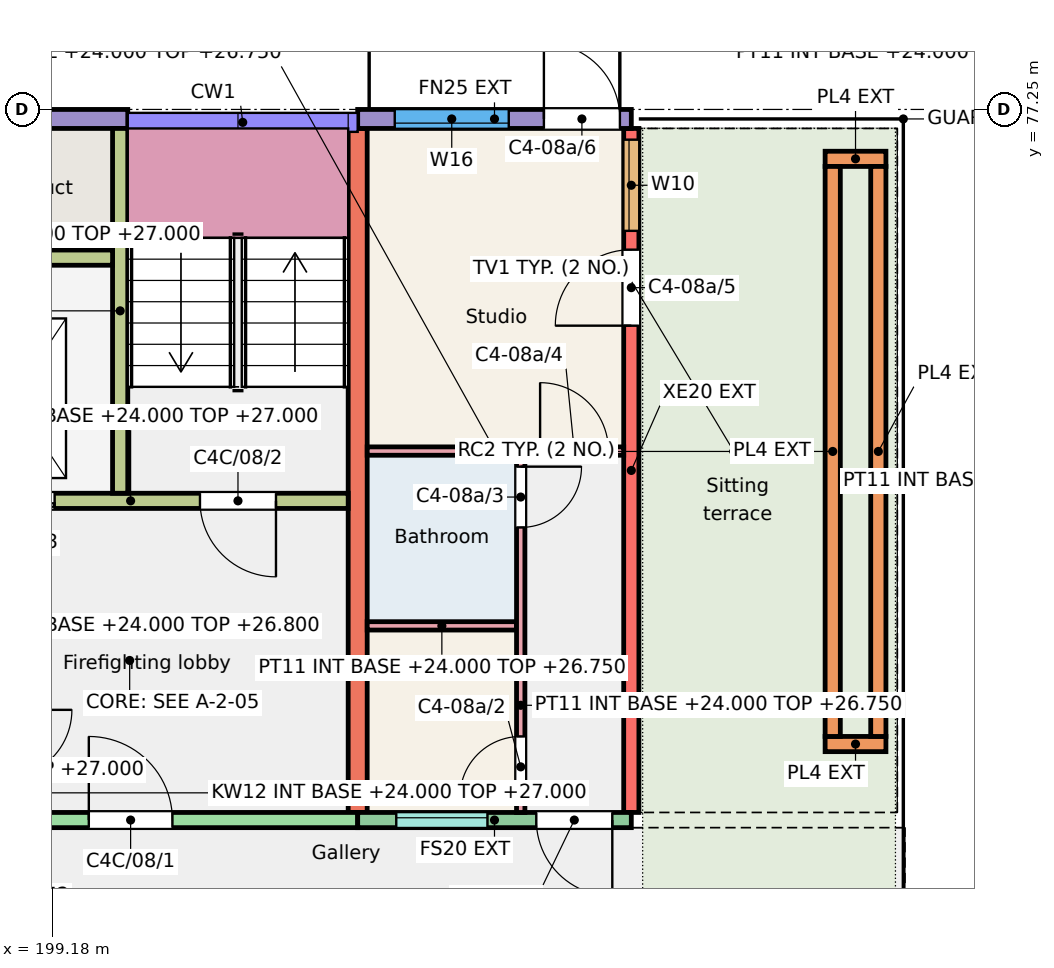
"""IFC4 building model, lengths in metres.
Left out: names, types, materials, properties, quantities, classifications, styles, units other than length and angle.
Written with IfcOpenShell. Run it as: python <this file> out.ifc"""

import sys

from ifc_helpers import new_model, si_unit, direction, frame, frame_2d, origin, place, context, subcontext, project, spatial, rectangle, extrude, element, fill, save


model = new_model("IFC4")
c1 = context("Model", 3, precision=1e-05, world=origin(), true_north=direction((0.0, 1.0)))
c2 = subcontext(c1, "Body", "Model", "MODEL_VIEW")
j1 = project(units=[si_unit("LENGTHUNIT", "METRE"), si_unit("PLANEANGLEUNIT", "RADIAN")], contexts=[c1])
p1 = place(None, origin())
s1 = spatial("IfcSite", under=j1, at=p1, CompositionType="ELEMENT")
p2 = place(p1, origin())
s2 = spatial("IfcBuilding", under=s1, at=p2, CompositionType="ELEMENT")
p3 = place(p2, frame((0.0, 0.0, 24.0)))
s3 = spatial("IfcBuildingStorey", under=s2, at=p3, CompositionType="ELEMENT", Elevation=24.0)
p4 = place(p3, frame((203.2, 68.0, 0.0), z_axis=(0.0, 0.0, 1.0), x_axis=(0.0, 1.0, 0.0)))
e1 = element("IfcWall", 1, at=p4, inside=s3, PredefinedType="SHEAR", context=c2, shape_type="SweptSolid", body=[
    extrude(rectangle(XDim=9.0, YDim=0.25, at=frame_2d((4.5, 0.0))), origin(), (0.0, 0.0, 1.0), 3.0),
])
p5 = place(p3, frame((206.8, 68.0, 0.0), z_axis=(0.0, 0.0, 1.0), x_axis=(0.0, 1.0, 0.0)))
e2 = element("IfcWall", 2, at=p5, inside=s3, PredefinedType="SHEAR", context=c2, shape_type="SweptSolid", body=[
    extrude(rectangle(XDim=9.0, YDim=0.2, at=frame_2d((4.5, 0.0))), origin(), (0.0, 0.0, 1.0), 3.0),
])
p6 = place(p5, frame((7.653, 0.0, 0.9)))
e3 = element("IfcOpeningElement", 3, at=p6, cuts=e2, PredefinedType="OPENING", context=c2, shape_type="SweptSolid", body=[
    extrude(rectangle(XDim=1.2, YDim=1.5, at=frame_2d((0.6, 0.75))), frame((0.0, 0.11, 0.0), z_axis=(0.0, -1.0, 0.0), x_axis=(1.0, 0.0, 0.0)), (0.0, 0.0, 1.0), 0.22),
])
p7 = place(p5, frame((6.405, 0.0, 0.0)))
e4 = element("IfcOpeningElement", 4, at=p7, cuts=e2, PredefinedType="OPENING", context=c2, shape_type="SweptSolid", body=[
    extrude(rectangle(XDim=1.0, YDim=2.1, at=frame_2d((0.5, 1.05))), frame((0.0, 0.11, 0.0), z_axis=(0.0, -1.0, 0.0), x_axis=(1.0, 0.0, 0.0)), (0.0, 0.0, 1.0), 0.22),
])
p8 = place(p3, frame((197.2, 77.125, 0.0), z_axis=(0.0, 0.0, 1.0), x_axis=(1.0, 0.0, 0.0)))
e5 = element("IfcWall", 5, at=p8, inside=s3, PredefinedType="SOLIDWALL", context=c2, shape_type="SweptSolid", body=[
    extrude(rectangle(XDim=2.975, YDim=0.25, at=frame_2d((1.488, 0.0))), origin(), (0.0, 0.0, 1.0), 3.0),
])
p9 = place(p3, frame((197.35, 67.9, 0.0), z_axis=(0.0, 0.0, 1.0), x_axis=(1.0, 0.0, 0.0)))
e6 = element("IfcWall", 6, at=p9, inside=s3, PredefinedType="SHEAR", context=c2, shape_type="SweptSolid", body=[
    extrude(rectangle(XDim=5.85, YDim=0.2, at=frame_2d((2.925, 0.0))), origin(), (0.0, 0.0, 1.0), 3.0),
])
p10 = place(p9, frame((2.312, 0.0, 0.0)))
e7 = element("IfcOpeningElement", 7, at=p10, cuts=e6, PredefinedType="OPENING", context=c2, shape_type="SweptSolid", body=[
    extrude(rectangle(XDim=1.1, YDim=2.1, at=frame_2d((0.55, 1.05))), frame((0.0, 0.11, 0.0), z_axis=(0.0, -1.0, 0.0), x_axis=(1.0, 0.0, 0.0)), (0.0, 0.0, 1.0), 0.22),
])
p11 = place(p3, frame((197.35, 72.1, 0.0), z_axis=(0.0, 0.0, 1.0), x_axis=(1.0, 0.0, 0.0)))
e8 = element("IfcWall", 8, at=p11, inside=s3, PredefinedType="SHEAR", context=c2, shape_type="SweptSolid", body=[
    extrude(rectangle(XDim=5.725, YDim=0.2, at=frame_2d((2.862, 0.0))), origin(), (0.0, 0.0, 1.0), 3.0),
])
p12 = place(p11, frame((3.775, 0.0, 0.0)))
e9 = element("IfcOpeningElement", 9, at=p12, cuts=e8, PredefinedType="OPENING", context=c2, shape_type="SweptSolid", body=[
    extrude(rectangle(XDim=1.0, YDim=2.1, at=frame_2d((0.5, 1.05))), frame((0.0, 0.11, 0.0), z_axis=(0.0, -1.0, 0.0), x_axis=(1.0, 0.0, 0.0)), (0.0, 0.0, 1.0), 0.22),
])
p13 = place(p11, frame((0.762, 0.0, 0.0)))
e10 = element("IfcOpeningElement", 10, at=p13, cuts=e8, PredefinedType="OPENING", context=c2, shape_type="SweptSolid", body=[
    extrude(rectangle(XDim=1.1, YDim=2.1, at=frame_2d((0.55, 1.05))), frame((0.0, 0.11, 0.0), z_axis=(0.0, -1.0, 0.0), x_axis=(1.0, 0.0, 0.0)), (0.0, 0.0, 1.0), 0.22),
])
p14 = place(p3, frame((200.075, 72.2, 0.0), z_axis=(0.0, 0.0, 1.0), x_axis=(0.0, 1.0, 0.0)))
e11 = element("IfcWall", 11, at=p14, inside=s3, PredefinedType="SHEAR", context=c2, shape_type="SweptSolid", body=[
    extrude(rectangle(XDim=4.8, YDim=0.2, at=frame_2d((2.4, 0.0))), origin(), (0.0, 0.0, 1.0), 3.0),
])
p15 = place(p3, frame((197.35, 75.3, 0.0), z_axis=(0.0, 0.0, 1.0), x_axis=(1.0, 0.0, 0.0)))
e12 = element("IfcWall", 12, at=p15, inside=s3, PredefinedType="SHEAR", context=c2, shape_type="SweptSolid", body=[
    extrude(rectangle(XDim=2.625, YDim=0.2, at=frame_2d((1.312, 0.0))), origin(), (0.0, 0.0, 1.0), 3.0),
])
p16 = place(p3, frame((203.2, 77.125, 0.0), z_axis=(0.0, 0.0, 1.0), x_axis=(1.0, 0.0, 0.0)))
e13 = element("IfcWall", 13, at=p16, inside=s3, PredefinedType="SOLIDWALL", context=c2, shape_type="SweptSolid", body=[
    extrude(rectangle(XDim=3.6, YDim=0.25, at=frame_2d((1.8, 0.0))), origin(), (0.0, 0.0, 1.0), 3.0),
])
p17 = place(p16, frame((0.488, 0.0, 0.9)))
e14 = element("IfcOpeningElement", 14, at=p17, cuts=e13, PredefinedType="OPENING", context=c2, shape_type="SweptSolid", body=[
    extrude(rectangle(XDim=1.5, YDim=1.5, at=frame_2d((0.75, 0.75))), frame((0.0, 0.135, 0.0), z_axis=(0.0, -1.0, 0.0), x_axis=(1.0, 0.0, 0.0)), (0.0, 0.0, 1.0), 0.27),
])
p18 = place(p16, frame((2.45, 0.0, 0.0)))
e15 = element("IfcOpeningElement", 15, at=p18, cuts=e13, PredefinedType="OPENING", context=c2, shape_type="SweptSolid", body=[
    extrude(rectangle(XDim=1.0, YDim=2.1, at=frame_2d((0.5, 1.05))), frame((0.0, 0.135, 0.0), z_axis=(0.0, -1.0, 0.0), x_axis=(1.0, 0.0, 0.0)), (0.0, 0.0, 1.0), 0.27),
])
p19 = place(p3, frame((203.2, 67.9, 0.0), z_axis=(0.0, 0.0, 1.0), x_axis=(1.0, 0.0, 0.0)))
e16 = element("IfcWall", 16, at=p19, inside=s3, PredefinedType="SOLIDWALL", context=c2, shape_type="SweptSolid", body=[
    extrude(rectangle(XDim=3.6, YDim=0.2, at=frame_2d((1.8, 0.0))), origin(), (0.0, 0.0, 1.0), 3.0),
])
p20 = place(p19, frame((0.508, 0.0, 1.1)))
e17 = element("IfcOpeningElement", 17, at=p20, cuts=e16, PredefinedType="OPENING", context=c2, shape_type="SweptSolid", body=[
    extrude(rectangle(XDim=1.2, YDim=1.3, at=frame_2d((0.6, 0.65))), frame((0.0, 0.11, 0.0), z_axis=(0.0, -1.0, 0.0), x_axis=(1.0, 0.0, 0.0)), (0.0, 0.0, 1.0), 0.22),
])
p21 = place(p19, frame((2.35, 0.0, 0.0)))
e18 = element("IfcOpeningElement", 18, at=p21, cuts=e16, PredefinedType="OPENING", context=c2, shape_type="SweptSolid", body=[
    extrude(rectangle(XDim=1.0, YDim=2.1, at=frame_2d((0.5, 1.05))), frame((0.0, 0.11, 0.0), z_axis=(0.0, -1.0, 0.0), x_axis=(1.0, 0.0, 0.0)), (0.0, 0.0, 1.0), 0.22),
])
for number, where, z_axis, x_axis in (
    (19, (209.35, 68.9, 0.01), (0.0, 0.0, 1.0), (1.0, 0.0, 0.0)),
    (20, (209.35, 76.6, 0.01), (0.0, 0.0, 1.0), (1.0, 0.0, 0.0)),
):
    element("IfcWall", number, at=place(p3, frame(where, z_axis=z_axis, x_axis=x_axis)), inside=s3, PredefinedType="SOLIDWALL", context=c2, shape_type="SweptSolid", body=[
        extrude(rectangle(XDim=0.8, YDim=0.2, at=frame_2d((0.4, 0.0))), origin(), (0.0, 0.0, 1.0), 0.45),
    ])
for number, where, z_axis, x_axis in (
    (21, (209.45, 69.0, 0.01), (0.0, 0.0, 1.0), (0.0, 1.0, 0.0)),
    (22, (210.05, 69.0, 0.01), (0.0, 0.0, 1.0), (0.0, 1.0, 0.0)),
):
    element("IfcWall", number, at=place(p3, frame(where, z_axis=z_axis, x_axis=x_axis)), inside=s3, PredefinedType="SOLIDWALL", context=c2, shape_type="SweptSolid", body=[
        extrude(rectangle(XDim=7.5, YDim=0.2, at=frame_2d((3.75, 0.0))), origin(), (0.0, 0.0, 1.0), 0.45),
    ])
p22 = place(p3, frame((203.325, 70.455, 0.0), z_axis=(0.0, 0.0, 1.0), x_axis=(1.0, 0.0, 0.0)))
e23 = element("IfcWall", 23, at=p22, inside=s3, PredefinedType="PARTITIONING", context=c2, shape_type="SweptSolid", body=[
    extrude(rectangle(XDim=1.965, YDim=0.11, at=frame_2d((0.982, 0.0))), origin(), (0.0, 0.0, 1.0), 2.75),
])
p23 = place(p3, frame((205.345, 68.0, 0.0), z_axis=(0.0, 0.0, 1.0), x_axis=(0.0, 1.0, 0.0)))
e24 = element("IfcWall", 24, at=p23, inside=s3, PredefinedType="PARTITIONING", context=c2, shape_type="SweptSolid", body=[
    extrude(rectangle(XDim=4.7, YDim=0.11, at=frame_2d((2.35, 0.0))), origin(), (0.0, 0.0, 1.0), 2.75),
])
p24 = place(p23, frame((0.2, 0.0, 0.0)))
e25 = element("IfcOpeningElement", 25, at=p24, cuts=e24, PredefinedType="OPENING", context=c2, shape_type="SweptSolid", body=[
    extrude(rectangle(XDim=0.8, YDim=2.1, at=frame_2d((0.4, 1.05))), frame((0.0, 0.065, 0.0), z_axis=(0.0, -1.0, 0.0), x_axis=(1.0, 0.0, 0.0)), (0.0, 0.0, 1.0), 0.13),
])
p25 = place(p23, frame((3.75, 0.0, 0.0)))
e26 = element("IfcOpeningElement", 26, at=p25, cuts=e24, PredefinedType="OPENING", context=c2, shape_type="SweptSolid", body=[
    extrude(rectangle(XDim=0.8, YDim=2.1, at=frame_2d((0.4, 1.05))), frame((0.0, 0.065, 0.0), z_axis=(0.0, -1.0, 0.0), x_axis=(1.0, 0.0, 0.0)), (0.0, 0.0, 1.0), 0.13),
])
p26 = place(p3, frame((203.325, 72.755, 0.0), z_axis=(0.0, 0.0, 1.0), x_axis=(1.0, 0.0, 0.0)))
e27 = element("IfcWall", 27, at=p26, inside=s3, PredefinedType="PARTITIONING", context=c2, shape_type="SweptSolid", body=[
    extrude(rectangle(XDim=3.375, YDim=0.11, at=frame_2d((1.688, 0.0))), origin(), (0.0, 0.0, 1.0), 2.75),
])
p27 = place(p26, frame((2.275, 0.0, 0.0)))
e28 = element("IfcOpeningElement", 28, at=p27, cuts=e27, PredefinedType="OPENING", context=c2, shape_type="SweptSolid", body=[
    extrude(rectangle(XDim=0.9, YDim=2.1, at=frame_2d((0.45, 1.05))), frame((0.0, 0.065, 0.0), z_axis=(0.0, -1.0, 0.0), x_axis=(1.0, 0.0, 0.0)), (0.0, 0.0, 1.0), 0.13),
])
p28 = place(p20, origin())
e29 = element("IfcWindow", 29, at=p28, inside=s3, PartitioningType="SINGLE_PANEL", PredefinedType="WINDOW", context=c2, shape_type="SweptSolid", body=[
    extrude(rectangle(XDim=1.2, YDim=1.3, at=frame_2d((0.6, 0.65))), frame((0.0, 0.06, 0.0), z_axis=(0.0, -1.0, 0.0), x_axis=(1.0, 0.0, 0.0)), (0.0, 0.0, 1.0), 0.06),
])
fill(e17, e29)
p29 = place(p17, origin())
e30 = element("IfcWindow", 30, at=p29, inside=s3, PartitioningType="SINGLE_PANEL", PredefinedType="WINDOW", context=c2, shape_type="SweptSolid", body=[
    extrude(rectangle(XDim=1.5, YDim=1.5, at=frame_2d((0.75, 0.75))), frame((0.0, -0.025, 0.0), z_axis=(0.0, -1.0, 0.0), x_axis=(1.0, 0.0, 0.0)), (0.0, 0.0, 1.0), 0.06),
])
fill(e14, e30)
p30 = place(p6, origin())
e31 = element("IfcWindow", 31, at=p30, inside=s3, PartitioningType="SINGLE_PANEL", PredefinedType="WINDOW", context=c2, shape_type="SweptSolid", body=[
    extrude(rectangle(XDim=1.2, YDim=1.5, at=frame_2d((0.6, 0.75))), frame((0.0, 0.06, 0.0), z_axis=(0.0, -1.0, 0.0), x_axis=(1.0, 0.0, 0.0)), (0.0, 0.0, 1.0), 0.06),
])
fill(e3, e31)
p31 = place(p21, origin())
e32 = element("IfcDoor", 32, at=p31, inside=s3, OperationType="SINGLE_SWING_RIGHT", PredefinedType="DOOR", context=c2, shape_type="SweptSolid", body=[
    extrude(rectangle(XDim=1.0, YDim=2.1, at=frame_2d((0.5, 1.05))), frame((0.0, 0.025, 0.0), z_axis=(0.0, -1.0, 0.0), x_axis=(1.0, 0.0, 0.0)), (0.0, 0.0, 1.0), 0.05),
])
fill(e18, e32)
p32 = place(p24, origin())
e33 = element("IfcDoor", 33, at=p32, inside=s3, OperationType="SINGLE_SWING_LEFT", PredefinedType="DOOR", context=c2, shape_type="SweptSolid", body=[
    extrude(rectangle(XDim=0.8, YDim=2.1, at=frame_2d((0.4, 1.05))), frame((0.0, 0.025, 0.0), z_axis=(0.0, -1.0, 0.0), x_axis=(1.0, 0.0, 0.0)), (0.0, 0.0, 1.0), 0.05),
])
fill(e25, e33)
p33 = place(p25, origin())
e34 = element("IfcDoor", 34, at=p33, inside=s3, OperationType="SINGLE_SWING_RIGHT", PredefinedType="DOOR", context=c2, shape_type="SweptSolid", body=[
    extrude(rectangle(XDim=0.8, YDim=2.1, at=frame_2d((0.4, 1.05))), frame((0.0, 0.025, 0.0), z_axis=(0.0, -1.0, 0.0), x_axis=(1.0, 0.0, 0.0)), (0.0, 0.0, 1.0), 0.05),
])
fill(e26, e34)
p34 = place(p27, origin())
e35 = element("IfcDoor", 35, at=p34, inside=s3, OperationType="SINGLE_SWING_LEFT", PredefinedType="DOOR", context=c2, shape_type="SweptSolid", body=[
    extrude(rectangle(XDim=0.9, YDim=2.1, at=frame_2d((0.45, 1.05))), frame((0.0, 0.025, 0.0), z_axis=(0.0, -1.0, 0.0), x_axis=(1.0, 0.0, 0.0)), (0.0, 0.0, 1.0), 0.05),
])
fill(e28, e35)
p35 = place(p7, origin())
e36 = element("IfcDoor", 36, at=p35, inside=s3, OperationType="SINGLE_SWING_LEFT", PredefinedType="DOOR", context=c2, shape_type="SweptSolid", body=[
    extrude(rectangle(XDim=1.0, YDim=2.1, at=frame_2d((0.5, 1.05))), frame((0.0, 0.025, 0.0), z_axis=(0.0, -1.0, 0.0), x_axis=(1.0, 0.0, 0.0)), (0.0, 0.0, 1.0), 0.05),
])
fill(e4, e36)
p36 = place(p18, origin())
e37 = element("IfcDoor", 37, at=p36, inside=s3, OperationType="SINGLE_SWING_LEFT", PredefinedType="DOOR", context=c2, shape_type="SweptSolid", body=[
    extrude(rectangle(XDim=1.0, YDim=2.1, at=frame_2d((0.5, 1.05))), frame((0.0, 0.025, 0.0), z_axis=(0.0, -1.0, 0.0), x_axis=(1.0, 0.0, 0.0)), (0.0, 0.0, 1.0), 0.05),
])
fill(e15, e37)
p37 = place(p10, origin())
e38 = element("IfcDoor", 38, at=p37, inside=s3, OperationType="SINGLE_SWING_LEFT", PredefinedType="DOOR", context=c2, shape_type="SweptSolid", body=[
    extrude(rectangle(XDim=1.1, YDim=2.1, at=frame_2d((0.55, 1.05))), frame((0.0, 0.025, 0.0), z_axis=(0.0, -1.0, 0.0), x_axis=(1.0, 0.0, 0.0)), (0.0, 0.0, 1.0), 0.05),
])
fill(e7, e38)
p38 = place(p12, origin())
e39 = element("IfcDoor", 39, at=p38, inside=s3, OperationType="SINGLE_SWING_RIGHT", PredefinedType="DOOR", context=c2, shape_type="SweptSolid", body=[
    extrude(rectangle(XDim=1.0, YDim=2.1, at=frame_2d((0.5, 1.05))), frame((0.0, 0.025, 0.0), z_axis=(0.0, -1.0, 0.0), x_axis=(1.0, 0.0, 0.0)), (0.0, 0.0, 1.0), 0.05),
])
fill(e9, e39)
p39 = place(p13, origin())
e40 = element("IfcDoor", 40, at=p39, inside=s3, OperationType="DOUBLE_DOOR_SLIDING", PredefinedType="DOOR", context=c2, shape_type="SweptSolid", body=[
    extrude(rectangle(XDim=1.1, YDim=2.1, at=frame_2d((0.55, 1.05))), frame((0.0, 0.025, 0.0), z_axis=(0.0, -1.0, 0.0), x_axis=(1.0, 0.0, 0.0)), (0.0, 0.0, 1.0), 0.05),
])
fill(e10, e40)
save(model, sys.argv[1])
